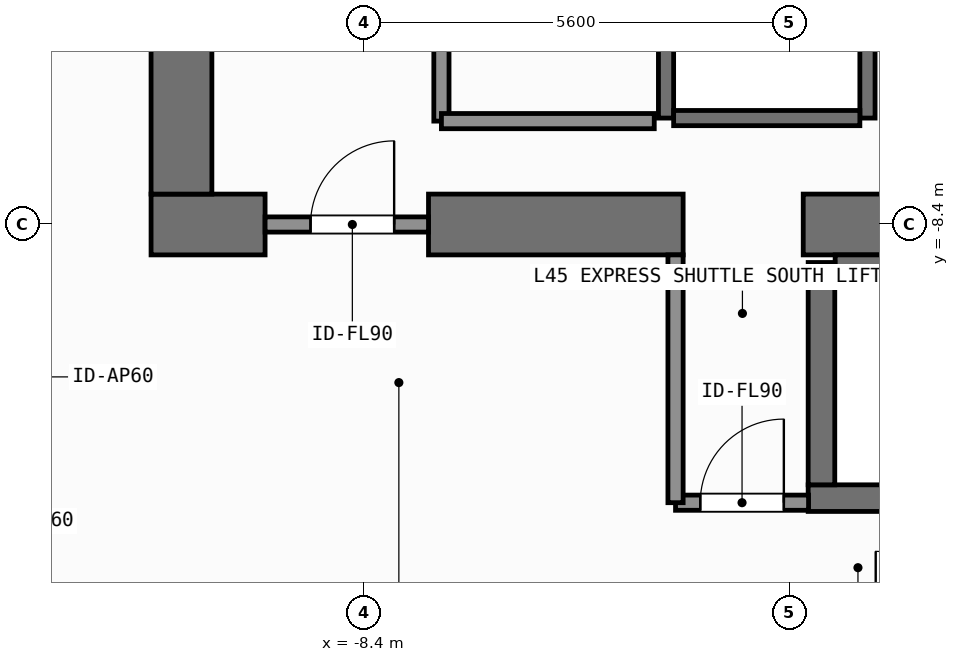
"""IFC4 building model, lengths in metres.
Left out: names, types, materials, properties, quantities, classifications, styles, units other than length and angle.
Written with IfcOpenShell. Run it as: python <this file> out.ifc"""

import sys

from ifc_helpers import new_model, si_unit, direction, frame, frame_2d, origin, place, context, subcontext, project, spatial, rectangle, extrude, element, fill, save


model = new_model("IFC4")
c1 = context("Model", 3, precision=1e-05, world=origin(), true_north=direction((0.0, 1.0)))
c2 = subcontext(c1, "Body", "Model", "MODEL_VIEW")
j1 = project(units=[si_unit("LENGTHUNIT", "METRE"), si_unit("PLANEANGLEUNIT", "RADIAN")], contexts=[c1])
p1 = place(None, origin())
s1 = spatial("IfcSite", under=j1, at=p1, CompositionType="ELEMENT")
p2 = place(p1, origin())
s2 = spatial("IfcBuilding", under=s1, at=p2, CompositionType="ELEMENT")
p3 = place(p2, frame((0.0, 0.0, 183.6)))
s3 = spatial("IfcBuildingStorey", under=s2, at=p3, CompositionType="ELEMENT", Elevation=183.6)
p4 = place(p3, frame((-11.2, -8.4, 0.0), z_axis=(0.0, 0.0, 1.0), x_axis=(1.0, 0.0, 0.0)))
e1 = element("IfcWall", 1, at=p4, inside=s3, PredefinedType="SHEAR", context=c2, shape_type="SweptSolid", body=[
    extrude(rectangle(XDim=1.5, YDim=0.8, at=frame_2d((0.75, 0.0))), origin(), (0.0, 0.0, 1.0), 3.9),
])
p5 = place(p3, frame((-7.55, -8.4, 0.0), z_axis=(0.0, 0.0, 1.0), x_axis=(1.0, 0.0, 0.0)))
e2 = element("IfcWall", 2, at=p5, inside=s3, PredefinedType="SHEAR", context=c2, shape_type="SweptSolid", body=[
    extrude(rectangle(XDim=3.35, YDim=0.8, at=frame_2d((1.675, 0.0))), origin(), (0.0, 0.0, 1.0), 3.9),
])
p6 = place(p3, frame((-2.62, -8.4, 0.0), z_axis=(0.0, 0.0, 1.0), x_axis=(1.0, 0.0, 0.0)))
e3 = element("IfcWall", 3, at=p6, inside=s3, PredefinedType="SHEAR", context=c2, shape_type="SweptSolid", body=[
    extrude(rectangle(XDim=7.27, YDim=0.8, at=frame_2d((3.635, 0.0))), origin(), (0.0, 0.0, 1.0), 3.9),
])
p7 = place(p3, frame((-10.8, -8.0, 0.0), z_axis=(0.0, 0.0, 1.0), x_axis=(0.0, 1.0, 0.0)))
e4 = element("IfcWall", 4, at=p7, inside=s3, PredefinedType="SHEAR", context=c2, shape_type="SweptSolid", body=[
    extrude(rectangle(XDim=16.0, YDim=0.8, at=frame_2d((8.0, 0.0))), origin(), (0.0, 0.0, 1.0), 3.9),
])
p8 = place(p3, frame((-2.555, -12.0, 0.0), z_axis=(0.0, 0.0, 1.0), x_axis=(1.0, 0.0, 0.0)))
e5 = element("IfcWall", 5, at=p8, inside=s3, PredefinedType="SHEAR", context=c2, shape_type="SweptSolid", body=[
    extrude(rectangle(XDim=7.31, YDim=0.35, at=frame_2d((3.655, 0.0))), origin(), (0.0, 0.0, 1.0), 3.9),
])
p9 = place(p3, frame((-2.2, -8.913, 0.0), z_axis=(0.0, 0.0, 1.0), x_axis=(1.0, 0.0, 0.0)))
e6 = element("IfcWall", 6, at=p9, inside=s3, PredefinedType="SHEAR", context=c2, shape_type="SweptSolid", body=[
    extrude(rectangle(XDim=6.6, YDim=0.225, at=frame_2d((3.3, 0.0))), origin(), (0.0, 0.0, 1.0), 3.9),
])
p10 = place(p3, frame((-2.38, -11.825, 0.0), z_axis=(0.0, 0.0, 1.0), x_axis=(0.0, 1.0, 0.0)))
e7 = element("IfcWall", 7, at=p10, inside=s3, PredefinedType="SHEAR", context=c2, shape_type="SweptSolid", body=[
    extrude(rectangle(XDim=2.925, YDim=0.35, at=frame_2d((1.462, 0.0))), origin(), (0.0, 0.0, 1.0), 3.9),
])
for number, where, z_axis, x_axis in (
    (8, (-4.425, -7.0, 0.0), (0.0, 0.0, 1.0), (0.0, 1.0, 0.0)),
    (9, (-1.775, -7.0, 0.0), (0.0, 0.0, 1.0), (0.0, 1.0, 0.0)),
):
    element("IfcWall", number, at=place(p3, frame(where, z_axis=z_axis, x_axis=x_axis)), inside=s3, PredefinedType="SHEAR", context=c2, shape_type="SweptSolid", body=[
        extrude(rectangle(XDim=2.8, YDim=0.2, at=frame_2d((1.4, 0.0))), origin(), (0.0, 0.0, 1.0), 3.68),
    ])
p11 = place(p3, frame((-4.325, -7.0, 0.0), z_axis=(0.0, 0.0, 1.0), x_axis=(1.0, 0.0, 0.0)))
e10 = element("IfcWall", 10, at=p11, inside=s3, PredefinedType="SHEAR", context=c2, shape_type="SweptSolid", body=[
    extrude(rectangle(XDim=2.45, YDim=0.2, at=frame_2d((1.225, 0.0))), origin(), (0.0, 0.0, 1.0), 3.68),
])
p12 = place(p3, frame((-9.7, -8.4, 0.0), z_axis=(0.0, 0.0, 1.0), x_axis=(1.0, 0.0, 0.0)))
e11 = element("IfcWall", 11, at=p12, inside=s3, PredefinedType="SOLIDWALL", context=c2, shape_type="SweptSolid", body=[
    extrude(rectangle(XDim=2.15, YDim=0.2, at=frame_2d((1.075, 0.0))), origin(), (0.0, 0.0, 1.0), 2.82),
])
p13 = place(p12, frame((0.598, 0.0, 0.0)))
e12 = element("IfcOpeningElement", 12, at=p13, cuts=e11, PredefinedType="OPENING", context=c2, shape_type="SweptSolid", body=[
    extrude(rectangle(XDim=1.1, YDim=2.15, at=frame_2d((0.55, 1.075))), frame((0.0, 0.11, 0.0), z_axis=(0.0, -1.0, 0.0), x_axis=(1.0, 0.0, 0.0)), (0.0, 0.0, 1.0), 0.22),
])
p14 = place(p3, frame((-4.3, -12.06, 0.0), z_axis=(0.0, 0.0, 1.0), x_axis=(1.0, 0.0, 0.0)))
e13 = element("IfcWall", 13, at=p14, inside=s3, PredefinedType="SOLIDWALL", context=c2, shape_type="SweptSolid", body=[
    extrude(rectangle(XDim=1.75, YDim=0.2, at=frame_2d((0.875, 0.0))), origin(), (0.0, 0.0, 1.0), 3.68),
])
p15 = place(p14, frame((0.325, 0.0, 0.0)))
e14 = element("IfcOpeningElement", 14, at=p15, cuts=e13, PredefinedType="OPENING", context=c2, shape_type="SweptSolid", body=[
    extrude(rectangle(XDim=1.1, YDim=2.15, at=frame_2d((0.55, 1.075))), frame((0.0, 0.11, 0.0), z_axis=(0.0, -1.0, 0.0), x_axis=(1.0, 0.0, 0.0)), (0.0, 0.0, 1.0), 0.22),
])
p16 = place(p3, frame((-7.38, -7.04, 0.0), z_axis=(0.0, 0.0, 1.0), x_axis=(0.0, 1.0, 0.0)))
e15 = element("IfcWall", 15, at=p16, inside=s3, PredefinedType="SOLIDWALL", context=c2, shape_type="SweptSolid", body=[
    extrude(rectangle(XDim=2.9, YDim=0.2, at=frame_2d((1.45, 0.0))), origin(), (0.0, 0.0, 1.0), 3.68),
])
p17 = place(p16, frame((0.99, 0.0, 0.0)))
e16 = element("IfcOpeningElement", 16, at=p17, cuts=e15, PredefinedType="OPENING", context=c2, shape_type="SweptSolid", body=[
    extrude(rectangle(XDim=0.92, YDim=2.1, at=frame_2d((0.46, 1.05))), frame((0.0, 0.11, 0.0), z_axis=(0.0, -1.0, 0.0), x_axis=(1.0, 0.0, 0.0)), (0.0, 0.0, 1.0), 0.22),
])
p18 = place(p3, frame((-4.3, -12.06, 0.0), z_axis=(0.0, 0.0, 1.0), x_axis=(0.0, 1.0, 0.0)))
e17 = element("IfcWall", 17, at=p18, inside=s3, PredefinedType="SOLIDWALL", context=c2, shape_type="SweptSolid", body=[
    extrude(rectangle(XDim=3.26, YDim=0.2, at=frame_2d((1.63, 0.0))), origin(), (0.0, 0.0, 1.0), 3.68),
])
p19 = place(p3, frame((-7.38, -7.04, 0.0), z_axis=(0.0, 0.0, 1.0), x_axis=(1.0, 0.0, 0.0)))
e18 = element("IfcWall", 18, at=p19, inside=s3, PredefinedType="SOLIDWALL", context=c2, shape_type="SweptSolid", body=[
    extrude(rectangle(XDim=2.8, YDim=0.2, at=frame_2d((1.4, 0.0))), origin(), (0.0, 0.0, 1.0), 3.68),
])
p20 = place(p13, origin())
e19 = element("IfcDoor", 19, at=p20, inside=s3, OperationType="SINGLE_SWING_RIGHT", PredefinedType="DOOR", context=c2, shape_type="SweptSolid", body=[
    extrude(rectangle(XDim=1.1, YDim=2.15, at=frame_2d((0.55, 1.075))), frame((0.0, 0.025, 0.0), z_axis=(0.0, -1.0, 0.0), x_axis=(1.0, 0.0, 0.0)), (0.0, 0.0, 1.0), 0.05),
])
fill(e12, e19)
p21 = place(p15, origin())
e20 = element("IfcDoor", 20, at=p21, inside=s3, OperationType="SINGLE_SWING_RIGHT", PredefinedType="DOOR", context=c2, shape_type="SweptSolid", body=[
    extrude(rectangle(XDim=1.1, YDim=2.15, at=frame_2d((0.55, 1.075))), frame((0.0, 0.025, 0.0), z_axis=(0.0, -1.0, 0.0), x_axis=(1.0, 0.0, 0.0)), (0.0, 0.0, 1.0), 0.05),
])
fill(e14, e20)
save(model, sys.argv[1])
